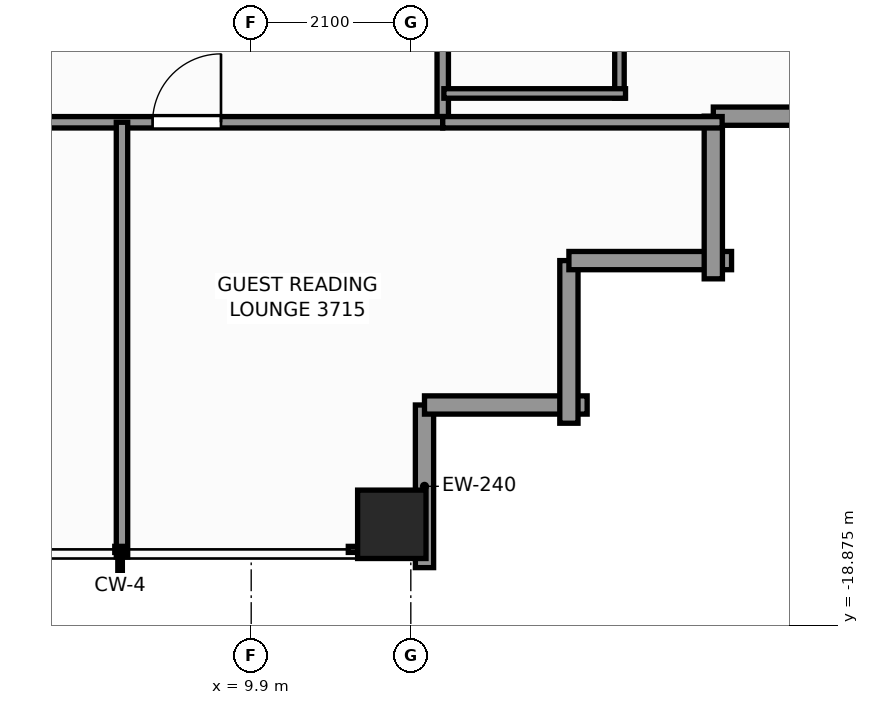
"""IFC4 building model, lengths in metres.
Left out: names, types, materials, properties, quantities, classifications, styles, units other than length and angle.
Written with IfcOpenShell. Run it as: python <this file> out.ifc"""

import sys

from ifc_helpers import new_model, si_unit, direction, frame, frame_2d, origin, origin_2d, place, context, subcontext, project, spatial, rectangle, extrude, element, fill, save


model = new_model("IFC4")
c1 = context("Model", 3, precision=1e-05, world=origin(), true_north=direction((0.0, 1.0)))
c2 = subcontext(c1, "Body", "Model", "MODEL_VIEW")
j1 = project(units=[si_unit("LENGTHUNIT", "METRE"), si_unit("PLANEANGLEUNIT", "RADIAN")], contexts=[c1])
p1 = place(None, origin())
s1 = spatial("IfcSite", under=j1, at=p1, CompositionType="ELEMENT")
p2 = place(p1, origin())
s2 = spatial("IfcBuilding", under=s1, at=p2, CompositionType="ELEMENT")
p3 = place(p2, frame((0.0, 0.0, 128.3)))
s3 = spatial("IfcBuildingStorey", under=s2, at=p3, CompositionType="ELEMENT", Elevation=128.3)
p4 = place(p3, frame((11.75, -17.55, 0.0), z_axis=(0.0, 0.0, 1.0), x_axis=(1.0, 0.0, 0.0)))
e1 = element("IfcColumn", 1, at=p4, inside=s3, PredefinedType="COLUMN", context=c2, shape_type="SweptSolid", body=[
    extrude(rectangle(XDim=0.9, YDim=0.9, at=origin_2d()), origin(), (0.0, 0.0, 1.0), 3.3),
])
for number, where, z_axis, x_axis in (
    (2, (12.18, -15.98, 0.0), (0.0, 0.0, 1.0), (0.0, -1.0, 0.0)),
    (3, (14.32, -15.98, 0.0), (0.0, 0.0, 1.0), (-1.0, 0.0, 0.0)),
):
    element("IfcWall", number, at=place(p3, frame(where, z_axis=z_axis, x_axis=x_axis)), inside=s3, PredefinedType="STANDARD", context=c2, shape_type="SweptSolid", body=[
        extrude(rectangle(XDim=2.14, YDim=0.24, at=frame_2d((1.07, 0.0))), origin(), (0.0, 0.0, 1.0), 2.479),
    ])
for number, where, z_axis, x_axis in (
    (4, (14.08, -14.08, 0.0), (0.0, 0.0, 1.0), (0.0, -1.0, 0.0)),
    (5, (16.22, -14.08, 0.0), (0.0, 0.0, 1.0), (-1.0, 0.0, 0.0)),
):
    element("IfcWall", number, at=place(p3, frame(where, z_axis=z_axis, x_axis=x_axis)), inside=s3, PredefinedType="STANDARD", context=c2, shape_type="SweptSolid", body=[
        extrude(rectangle(XDim=2.14, YDim=0.24, at=frame_2d((1.07, 0.0))), origin(), (0.0, 0.0, 1.0), 2.479),
    ])
for number, where, z_axis, x_axis in (
    (6, (15.98, -12.18, 0.0), (0.0, 0.0, 1.0), (0.0, -1.0, 0.0)),
    (7, (18.12, -12.18, 0.0), (0.0, 0.0, 1.0), (-1.0, 0.0, 0.0)),
):
    element("IfcWall", number, at=place(p3, frame(where, z_axis=z_axis, x_axis=x_axis)), inside=s3, PredefinedType="STANDARD", context=c2, shape_type="SweptSolid", body=[
        extrude(rectangle(XDim=2.14, YDim=0.24, at=frame_2d((1.07, 0.0))), origin(), (0.0, 0.0, 1.0), 2.479),
    ])
p5 = place(p3, frame((12.42, -12.26, 0.0), z_axis=(0.0, 0.0, 1.0), x_axis=(0.0, 1.0, 0.0)))
e8 = element("IfcWall", 8, at=p5, inside=s3, PredefinedType="PARTITIONING", context=c2, shape_type="SweptSolid", body=[
    extrude(rectangle(XDim=24.84, YDim=0.15, at=frame_2d((12.42, 0.0))), origin(), (0.0, 0.0, 1.0), 2.312),
])
p6 = place(p5, frame((3.831, 0.0, 0.0)))
e9 = element("IfcOpeningElement", 9, at=p6, cuts=e8, PredefinedType="OPENING", context=c2, shape_type="SweptSolid", body=[
    extrude(rectangle(XDim=0.95, YDim=2.06, at=frame_2d((0.475, 1.03))), frame((0.0, 0.085, 0.0), z_axis=(0.0, -1.0, 0.0), x_axis=(1.0, 0.0, 0.0)), (0.0, 0.0, 1.0), 0.17),
])
p7 = place(p5, frame((5.797, 0.0, 0.0)))
e10 = element("IfcOpeningElement", 10, at=p7, cuts=e8, PredefinedType="OPENING", context=c2, shape_type="SweptSolid", body=[
    extrude(rectangle(XDim=0.9, YDim=2.06, at=frame_2d((0.45, 1.03))), frame((0.0, 0.085, 0.0), z_axis=(0.0, -1.0, 0.0), x_axis=(1.0, 0.0, 0.0)), (0.0, 0.0, 1.0), 0.17),
])
p8 = place(p5, frame((13.146, 0.0, 0.0)))
e11 = element("IfcOpeningElement", 11, at=p8, cuts=e8, PredefinedType="OPENING", context=c2, shape_type="SweptSolid", body=[
    extrude(rectangle(XDim=0.95, YDim=2.06, at=frame_2d((0.475, 1.03))), frame((0.0, 0.085, 0.0), z_axis=(0.0, -1.0, 0.0), x_axis=(1.0, 0.0, 0.0)), (0.0, 0.0, 1.0), 0.17),
])
p9 = place(p5, frame((18.673, 0.0, 0.0)))
e12 = element("IfcOpeningElement", 12, at=p9, cuts=e8, PredefinedType="OPENING", context=c2, shape_type="SweptSolid", body=[
    extrude(rectangle(XDim=0.95, YDim=2.06, at=frame_2d((0.475, 1.03))), frame((0.0, 0.085, 0.0), z_axis=(0.0, -1.0, 0.0), x_axis=(1.0, 0.0, 0.0)), (0.0, 0.0, 1.0), 0.17),
])
p10 = place(p5, frame((20.836, 0.0, 0.0)))
e13 = element("IfcOpeningElement", 13, at=p10, cuts=e8, PredefinedType="OPENING", context=c2, shape_type="SweptSolid", body=[
    extrude(rectangle(XDim=0.9, YDim=2.06, at=frame_2d((0.45, 1.03))), frame((0.0, 0.085, 0.0), z_axis=(0.0, -1.0, 0.0), x_axis=(1.0, 0.0, 0.0)), (0.0, 0.0, 1.0), 0.17),
])
p11 = place(p3, frame((-3.65, -12.26, 0.0), z_axis=(0.0, 0.0, 1.0), x_axis=(1.0, 0.0, 0.0)))
e14 = element("IfcWall", 14, at=p11, inside=s3, PredefinedType="PARTITIONING", context=c2, shape_type="SweptSolid", body=[
    extrude(rectangle(XDim=16.07, YDim=0.15, at=frame_2d((8.035, 0.0))), origin(), (0.0, 0.0, 1.0), 2.312),
])
p12 = place(p11, frame((0.936, 0.0, 0.0)))
e15 = element("IfcOpeningElement", 15, at=p12, cuts=e14, PredefinedType="OPENING", context=c2, shape_type="SweptSolid", body=[
    extrude(rectangle(XDim=0.95, YDim=2.06, at=frame_2d((0.475, 1.03))), frame((0.0, 0.085, 0.0), z_axis=(0.0, -1.0, 0.0), x_axis=(1.0, 0.0, 0.0)), (0.0, 0.0, 1.0), 0.17),
])
p13 = place(p11, frame((9.893, 0.0, 0.0)))
e16 = element("IfcOpeningElement", 16, at=p13, cuts=e14, PredefinedType="OPENING", context=c2, shape_type="SweptSolid", body=[
    extrude(rectangle(XDim=0.95, YDim=2.06, at=frame_2d((0.475, 1.03))), frame((0.0, 0.085, 0.0), z_axis=(0.0, -1.0, 0.0), x_axis=(1.0, 0.0, 0.0)), (0.0, 0.0, 1.0), 0.17),
])
p14 = place(p11, frame((12.253, 0.0, 0.0)))
e17 = element("IfcOpeningElement", 17, at=p14, cuts=e14, PredefinedType="OPENING", context=c2, shape_type="SweptSolid", body=[
    extrude(rectangle(XDim=0.9, YDim=2.06, at=frame_2d((0.45, 1.03))), frame((0.0, 0.085, 0.0), z_axis=(0.0, -1.0, 0.0), x_axis=(1.0, 0.0, 0.0)), (0.0, 0.0, 1.0), 0.17),
])
p15 = place(p3, frame((12.42, -12.26, 0.0), z_axis=(0.0, 0.0, 1.0), x_axis=(1.0, 0.0, 0.0)))
e18 = element("IfcWall", 18, at=p15, inside=s3, PredefinedType="PARTITIONING", context=c2, shape_type="SweptSolid", body=[
    extrude(rectangle(XDim=3.676, YDim=0.15, at=frame_2d((1.838, 0.0))), origin(), (0.0, 0.0, 1.0), 3.1),
])
p16 = place(p3, frame((14.745, -11.941, 0.0), z_axis=(0.0, 0.0, 1.0), x_axis=(0.0, 1.0, 0.0)))
e19 = element("IfcWall", 19, at=p16, inside=s3, PredefinedType="PARTITIONING", context=c2, shape_type="SweptSolid", body=[
    extrude(rectangle(XDim=2.77, YDim=0.125, at=frame_2d((1.385, 0.0))), origin(), (0.0, 0.0, 1.0), 2.312),
])
p17 = place(p3, frame((12.435, -11.881, 0.0), z_axis=(0.0, 0.0, 1.0), x_axis=(1.0, 0.0, 0.0)))
e20 = element("IfcWall", 20, at=p17, inside=s3, PredefinedType="PARTITIONING", context=c2, shape_type="SweptSolid", body=[
    extrude(rectangle(XDim=2.39, YDim=0.125, at=frame_2d((1.195, 0.0))), origin(), (0.0, 0.0, 1.0), 3.1),
])
p18 = place(p3, frame((8.2, -17.98, 0.0), z_axis=(0.0, 0.0, 1.0), x_axis=(0.0, 1.0, 0.0)))
e21 = element("IfcWall", 21, at=p18, inside=s3, PredefinedType="PARTITIONING", context=c2, shape_type="SweptSolid", body=[
    extrude(rectangle(XDim=5.72, YDim=0.15, at=frame_2d((2.86, 0.0))), origin(), (0.0, 0.0, 1.0), 2.469),
])
p19 = place(p14, origin())
e22 = element("IfcDoor", 22, at=p19, inside=s3, OperationType="SINGLE_SWING_RIGHT", PredefinedType="DOOR", context=c2, shape_type="SweptSolid", body=[
    extrude(rectangle(XDim=0.9, YDim=2.06, at=frame_2d((0.45, 1.03))), frame((0.0, 0.025, 0.0), z_axis=(0.0, -1.0, 0.0), x_axis=(1.0, 0.0, 0.0)), (0.0, 0.0, 1.0), 0.05),
])
fill(e17, e22)
save(model, sys.argv[1])
